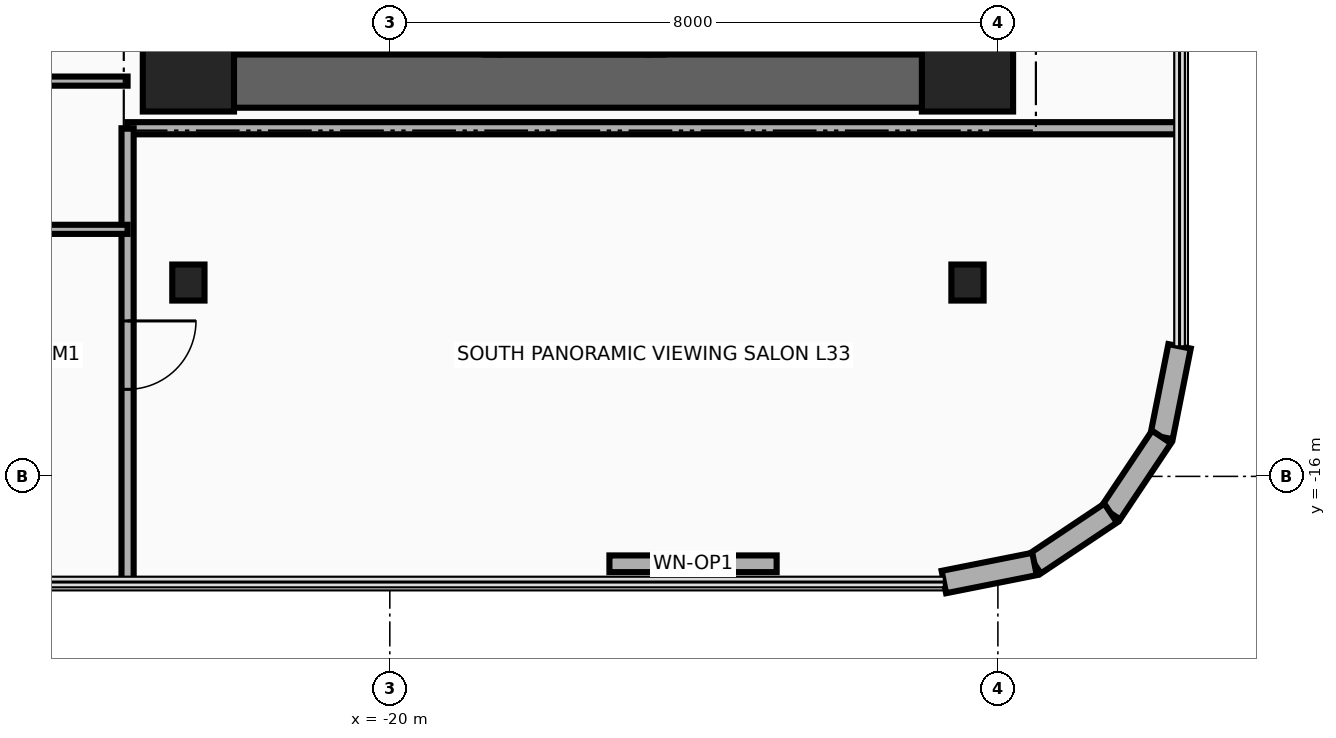
"""IFC4 building model, lengths in metres.
Left out: names, types, materials, properties, quantities, classifications, styles, units other than length and angle.
Written with IfcOpenShell. Run it as: python <this file> out.ifc"""

import sys

from ifc_helpers import new_model, si_unit, direction, frame, frame_2d, origin, origin_2d, place, context, subcontext, project, spatial, rectangle, i_section, extrude, source, transform, mapped, element, fill, save


model = new_model("IFC4")
c1 = context("Model", 3, precision=1e-05, world=origin(), true_north=direction((0.0, 1.0)))
c2 = subcontext(c1, "Body", "Model", "MODEL_VIEW")
j1 = project(units=[si_unit("LENGTHUNIT", "METRE"), si_unit("PLANEANGLEUNIT", "RADIAN")], contexts=[c1])
p1 = place(None, origin())
s1 = spatial("IfcSite", under=j1, at=p1, CompositionType="ELEMENT")
p2 = place(p1, origin())
s2 = spatial("IfcBuilding", under=s1, at=p2, CompositionType="ELEMENT")
p3 = place(p2, frame((0.0, 0.0, 131.6)))
s3 = spatial("IfcBuildingStorey", under=s2, at=p3, CompositionType="ELEMENT", Elevation=131.6)
for number, where, z_axis, x_axis in (
    (1, (-22.16, -10.45, 0.0), (0.0, 0.0, 1.0), (0.0, 1.0, 0.0)),
    (2, (-18.83, -10.45, 0.0), (0.0, 0.0, 1.0), (0.0, 1.0, 0.0)),
):
    element("IfcWall", number, at=place(p3, frame(where, z_axis=z_axis, x_axis=x_axis)), inside=s3, PredefinedType="SHEAR", context=c2, shape_type="SweptSolid", body=[
        extrude(rectangle(XDim=8.67, YDim=0.22, at=frame_2d((4.335, 0.0))), origin(), (0.0, 0.0, 1.0), 3.46),
    ])
p4 = place(p3, frame((-22.65, -11.15, 0.0), z_axis=(0.0, 0.0, 1.0), x_axis=(0.0, 1.0, 0.0)))
e3 = element("IfcWall", 3, at=p4, inside=s3, PredefinedType="SHEAR", context=c2, shape_type="SweptSolid", body=[
    extrude(rectangle(XDim=22.3, YDim=0.7, at=frame_2d((11.15, 0.0))), origin(), (0.0, 0.0, 1.0), 3.46),
])
p5 = place(p3, frame((-22.65, -10.8, 0.0), z_axis=(0.0, 0.0, 1.0), x_axis=(1.0, 0.0, 0.0)))
e4 = element("IfcWall", 4, at=p5, inside=s3, PredefinedType="SHEAR", context=c2, shape_type="SweptSolid", body=[
    extrude(rectangle(XDim=10.25, YDim=0.7, at=frame_2d((5.125, 0.0))), origin(), (0.0, 0.0, 1.0), 3.46),
])
m1 = source(origin(), c2, "Body", "SweptSolid", [
    extrude(rectangle(XDim=1.2, YDim=1.2, at=origin_2d()), origin(), (0.0, 0.0, 1.0), 3.7),
])
for number, where, z_axis, x_axis in (
    (5, (-22.65, -10.6, 0.0), (0.0, 0.0, 1.0), (1.0, 0.0, 0.0)),
    (6, (-12.4, -10.6, 0.0), (0.0, 0.0, 1.0), (1.0, 0.0, 0.0)),
):
    element("IfcColumn", number, at=place(p3, frame(where, z_axis=z_axis, x_axis=x_axis)), inside=s3, PredefinedType="COLUMN", context=c2, shape_type="MappedRepresentation", body=[
        mapped(m1, transform((0.0, 0.0, 0.0), x_axis=(1.0, 0.0, 0.0), y_axis=(0.0, 1.0, 0.0), z_axis=(0.0, 0.0, 1.0), scale=1.0)),
    ])
m2 = source(origin(), c2, "Body", "SweptSolid", [
    extrude(i_section(OverallWidth=0.424, OverallDepth=0.474, WebThickness=0.048, FlangeThickness=0.077, at=origin_2d()), origin(), (0.0, 0.0, 1.0), 3.7),
])
for number, where, z_axis, x_axis in (
    (7, (-22.65, -13.45, 0.0), (0.0, 0.0, 1.0), (1.0, 0.0, 0.0)),
    (8, (-12.4, -13.45, 0.0), (0.0, 0.0, 1.0), (1.0, 0.0, 0.0)),
):
    element("IfcColumn", number, at=place(p3, frame(where, z_axis=z_axis, x_axis=x_axis)), inside=s3, PredefinedType="COLUMN", context=c2, shape_type="MappedRepresentation", body=[
        mapped(m2, transform((0.0, 0.0, 0.0), x_axis=(1.0, 0.0, 0.0), y_axis=(0.0, 1.0, 0.0), z_axis=(0.0, 0.0, 1.0), scale=1.0)),
    ])
p6 = place(p3, frame((-9.61, -14.289, 0.0), z_axis=(0.0, 0.0, 1.0), x_axis=(-0.194996050505, -0.980804027463, 0.0)))
e9 = element("IfcWall", 9, at=p6, inside=s3, PredefinedType="SOLIDWALL", context=c2, shape_type="SweptSolid", body=[
    extrude(rectangle(XDim=1.216, YDim=0.3, at=frame_2d((0.608, 0.0))), origin(), (0.0, 0.0, 1.0), 3.46),
])
for number, where, z_axis, x_axis in (
    (10, (-9.847, -15.482, 0.0), (0.0, 0.0, 1.0), (-0.556, -0.831, 0.0)),
    (11, (-10.517, -16.483, 0.0), (0.0, 0.0, 1.0), (-0.831, -0.556, 0.0)),
):
    element("IfcWall", number, at=place(p3, frame(where, z_axis=z_axis, x_axis=x_axis)), inside=s3, PredefinedType="SOLIDWALL", context=c2, shape_type="SweptSolid", body=[
        extrude(rectangle(XDim=1.205, YDim=0.3, at=frame_2d((0.603, 0.0))), origin(), (0.0, 0.0, 1.0), 3.46),
    ])
p7 = place(p3, frame((-11.518, -17.153, 0.0), z_axis=(0.0, 0.0, 1.0), x_axis=(-0.980804027463, -0.194996050505, 0.0)))
e12 = element("IfcWall", 12, at=p7, inside=s3, PredefinedType="SOLIDWALL", context=c2, shape_type="SweptSolid", body=[
    extrude(rectangle(XDim=1.216, YDim=0.3, at=frame_2d((0.608, 0.0))), origin(), (0.0, 0.0, 1.0), 3.46),
])
p8 = place(p3, frame((-14.911, -17.15, 0.0), z_axis=(0.0, 0.0, 1.0), x_axis=(-1.0, 0.0, 0.0)))
e13 = element("IfcWall", 13, at=p8, inside=s3, PredefinedType="SOLIDWALL", context=c2, shape_type="SweptSolid", body=[
    extrude(rectangle(XDim=2.2, YDim=0.22, at=frame_2d((1.1, 0.0))), origin(), (0.0, 0.0, 1.0), 3.46),
])
p9 = place(p8, frame((0.65, 0.0, 0.95)))
e14 = element("IfcOpeningElement", 14, at=p9, cuts=e13, PredefinedType="OPENING", context=c2, shape_type="SweptSolid", body=[
    extrude(rectangle(XDim=0.9, YDim=1.3, at=frame_2d((0.45, 0.65))), frame((0.0, 0.125, 0.0), z_axis=(0.0, -1.0, 0.0), x_axis=(1.0, 0.0, 0.0)), (0.0, 0.0, 1.0), 0.25),
])
for number, where, z_axis, x_axis in (
    (15, (-18.65, -10.45, 0.0), (0.0, 0.0, 1.0), (0.0, 1.0, 0.0)),
    (16, (-16.5, -10.45, 0.0), (0.0, 0.0, 1.0), (0.0, 1.0, 0.0)),
):
    element("IfcWall", number, at=place(p3, frame(where, z_axis=z_axis, x_axis=x_axis)), inside=s3, PredefinedType="MOVABLE", context=c2, shape_type="SweptSolid", body=[
        extrude(rectangle(XDim=2.35, YDim=0.2, at=frame_2d((1.175, 0.0))), origin(), (0.0, 0.0, 1.0), 2.666),
    ])
p10 = place(p3, frame((-18.55, -10.35, 0.0), z_axis=(0.0, 0.0, 1.0), x_axis=(1.0, 0.0, 0.0)))
e17 = element("IfcWall", 17, at=p10, inside=s3, PredefinedType="MOVABLE", context=c2, shape_type="SweptSolid", body=[
    extrude(rectangle(XDim=1.95, YDim=0.2, at=frame_2d((0.975, 0.0))), origin(), (0.0, 0.0, 1.0), 2.666),
])
p11 = place(p3, frame((-23.45, -11.42, 0.0), z_axis=(0.0, 0.0, 1.0), x_axis=(1.0, 0.0, 0.0)))
e18 = element("IfcWall", 18, at=p11, inside=s3, PredefinedType="PARTITIONING", context=c2, shape_type="SweptSolid", body=[
    extrude(rectangle(XDim=13.84, YDim=0.16, at=frame_2d((6.92, 0.0))), origin(), (0.0, 0.0, 1.0), 2.834),
])
p12 = place(p3, frame((-23.45, -17.39, 0.0), z_axis=(0.0, 0.0, 1.0), x_axis=(0.0, 1.0, 0.0)))
e19 = element("IfcWall", 19, at=p12, inside=s3, PredefinedType="PARTITIONING", context=c2, shape_type="SweptSolid", body=[
    extrude(rectangle(XDim=5.97, YDim=0.16, at=frame_2d((2.985, 0.0))), origin(), (0.0, 0.0, 1.0), 3.46),
])
p13 = place(p12, frame((2.535, 0.0, 0.0)))
e20 = element("IfcOpeningElement", 20, at=p13, cuts=e19, PredefinedType="OPENING", context=c2, shape_type="SweptSolid", body=[
    extrude(rectangle(XDim=0.9, YDim=2.1, at=frame_2d((0.45, 1.05))), frame((0.0, 0.095, 0.0), z_axis=(0.0, -1.0, 0.0), x_axis=(1.0, 0.0, 0.0)), (0.0, 0.0, 1.0), 0.19),
])
p14 = place(p3, frame((-26.708, -10.8, 0.0), z_axis=(0.0, 0.0, 1.0), x_axis=(1.0, 0.0, 0.0)))
e21 = element("IfcWall", 21, at=p14, inside=s3, PredefinedType="PARTITIONING", context=c2, shape_type="SweptSolid", body=[
    extrude(rectangle(XDim=3.259, YDim=0.12, at=frame_2d((1.629, 0.0))), origin(), (0.0, 0.0, 1.0), 2.666),
])
p15 = place(p3, frame((-26.708, -12.75, 0.0), z_axis=(0.0, 0.0, 1.0), x_axis=(1.0, 0.0, 0.0)))
e22 = element("IfcWall", 22, at=p15, inside=s3, PredefinedType="PARTITIONING", context=c2, shape_type="SweptSolid", body=[
    extrude(rectangle(XDim=3.259, YDim=0.12, at=frame_2d((1.629, 0.0))), origin(), (0.0, 0.0, 1.0), 3.46),
])
p16 = place(p9, origin())
e23 = element("IfcWindow", 23, at=p16, inside=s3, PartitioningType="SINGLE_PANEL", PredefinedType="WINDOW", context=c2, shape_type="SweptSolid", body=[
    extrude(rectangle(XDim=0.9, YDim=1.3, at=frame_2d((0.45, 0.65))), frame((0.0, 0.03, 0.0), z_axis=(0.0, -1.0, 0.0), x_axis=(1.0, 0.0, 0.0)), (0.0, 0.0, 1.0), 0.06),
])
fill(e14, e23)
p17 = place(p13, frame((0.9, 0.0, 0.0), z_axis=(0.0, 0.0, 1.0), x_axis=(-1.0, 0.0, 0.0)))
e24 = element("IfcDoor", 24, at=p17, inside=s3, OperationType="SINGLE_SWING_LEFT", PredefinedType="DOOR", context=c2, shape_type="SweptSolid", body=[
    extrude(rectangle(XDim=0.9, YDim=2.1, at=frame_2d((0.45, 1.05))), frame((0.0, 0.025, 0.0), z_axis=(0.0, -1.0, 0.0), x_axis=(1.0, 0.0, 0.0)), (0.0, 0.0, 1.0), 0.05),
])
fill(e20, e24)
save(model, sys.argv[1])
